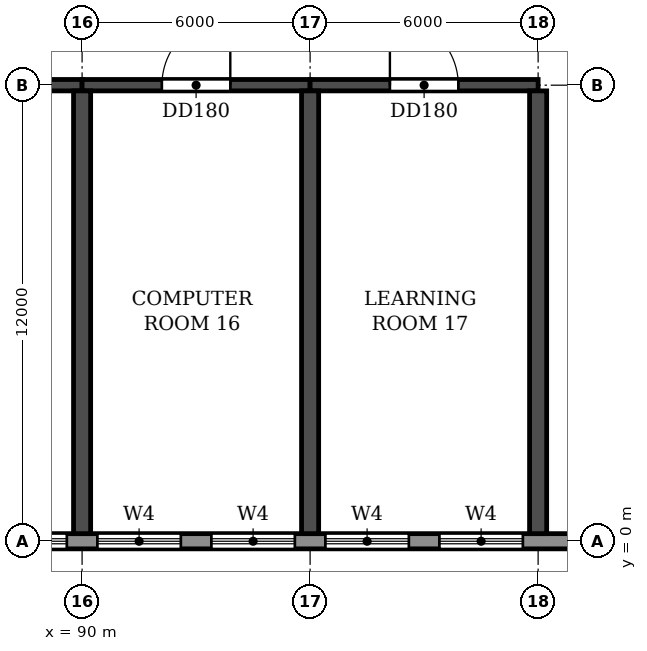
"""IFC4 building model, lengths in metres.
Left out: names, types, materials, properties, quantities, classifications, styles, units other than length and angle.
Written with IfcOpenShell. Run it as: python <this file> out.ifc"""

import sys

from ifc_helpers import new_model, si_unit, direction, frame, frame_2d, origin, place, context, subcontext, project, spatial, rectangle, extrude, element, fill, save


model = new_model("IFC4")
c1 = context("Model", 3, precision=1e-05, world=origin(), true_north=direction((0.0, 1.0)))
c2 = subcontext(c1, "Body", "Model", "MODEL_VIEW")
j1 = project(units=[si_unit("LENGTHUNIT", "METRE"), si_unit("PLANEANGLEUNIT", "RADIAN")], contexts=[c1])
p1 = place(None, origin())
s1 = spatial("IfcSite", under=j1, at=p1, CompositionType="ELEMENT")
p2 = place(p1, origin())
s2 = spatial("IfcBuilding", under=s1, at=p2, CompositionType="ELEMENT")
p3 = place(p2, frame((0.0, 0.0, 15.0)))
s3 = spatial("IfcBuildingStorey", under=s2, at=p3, CompositionType="ELEMENT", Elevation=15.0)
for number, where, z_axis, x_axis in (
    (1, (90.0, 0.2, 0.0), (0.0, 0.0, 1.0), (0.0, 1.0, 0.0)),
    (2, (96.0, 0.2, 0.0), (0.0, 0.0, 1.0), (0.0, 1.0, 0.0)),
    (3, (102.0, 0.2, 0.0), (0.0, 0.0, 1.0), (0.0, 1.0, 0.0)),
):
    element("IfcWall", number, at=place(p3, frame(where, z_axis=z_axis, x_axis=x_axis)), inside=s3, PredefinedType="SHEAR", context=c2, shape_type="SweptSolid", body=[
        extrude(rectangle(XDim=11.65, YDim=0.45, at=frame_2d((5.825, 0.0))), origin(), (0.0, 0.0, 1.0), 3.92),
    ])
p4 = place(p3, frame((84.0, 12.0, 0.0), z_axis=(0.0, 0.0, 1.0), x_axis=(1.0, 0.0, 0.0)))
e4 = element("IfcWall", 4, at=p4, inside=s3, PredefinedType="SHEAR", context=c2, shape_type="SweptSolid", body=[
    extrude(rectangle(XDim=6.0, YDim=0.3, at=frame_2d((3.0, 0.0))), origin(), (0.0, 0.0, 1.0), 3.32),
])
p5 = place(p4, frame((2.1, 0.0, 0.0)))
e5 = element("IfcOpeningElement", 5, at=p5, cuts=e4, PredefinedType="OPENING", context=c2, shape_type="SweptSolid", body=[
    extrude(rectangle(XDim=1.8, YDim=2.1, at=frame_2d((0.9, 1.05))), frame((0.0, 0.16, 0.0), z_axis=(0.0, -1.0, 0.0), x_axis=(1.0, 0.0, 0.0)), (0.0, 0.0, 1.0), 0.32),
])
p6 = place(p3, frame((90.0, 12.0, 0.0), z_axis=(0.0, 0.0, 1.0), x_axis=(1.0, 0.0, 0.0)))
e6 = element("IfcWall", 6, at=p6, inside=s3, PredefinedType="SHEAR", context=c2, shape_type="SweptSolid", body=[
    extrude(rectangle(XDim=6.0, YDim=0.3, at=frame_2d((3.0, 0.0))), origin(), (0.0, 0.0, 1.0), 3.32),
])
p7 = place(p6, frame((2.1, 0.0, 0.0)))
e7 = element("IfcOpeningElement", 7, at=p7, cuts=e6, PredefinedType="OPENING", context=c2, shape_type="SweptSolid", body=[
    extrude(rectangle(XDim=1.8, YDim=2.1, at=frame_2d((0.9, 1.05))), frame((0.0, 0.16, 0.0), z_axis=(0.0, -1.0, 0.0), x_axis=(1.0, 0.0, 0.0)), (0.0, 0.0, 1.0), 0.32),
])
p8 = place(p3, frame((96.0, 12.0, 0.0), z_axis=(0.0, 0.0, 1.0), x_axis=(1.0, 0.0, 0.0)))
e8 = element("IfcWall", 8, at=p8, inside=s3, PredefinedType="SHEAR", context=c2, shape_type="SweptSolid", body=[
    extrude(rectangle(XDim=6.0, YDim=0.3, at=frame_2d((3.0, 0.0))), origin(), (0.0, 0.0, 1.0), 3.32),
])
p9 = place(p8, frame((2.1, 0.0, 0.0)))
e9 = element("IfcOpeningElement", 9, at=p9, cuts=e8, PredefinedType="OPENING", context=c2, shape_type="SweptSolid", body=[
    extrude(rectangle(XDim=1.8, YDim=2.1, at=frame_2d((0.9, 1.05))), frame((0.0, 0.16, 0.0), z_axis=(0.0, -1.0, 0.0), x_axis=(1.0, 0.0, 0.0)), (0.0, 0.0, 1.0), 0.32),
])
p10 = place(p3, frame((-3.0, 0.0, 0.0), z_axis=(0.0, 0.0, 1.0), x_axis=(1.0, 0.0, 0.0)))
e10 = element("IfcWall", 10, at=p10, inside=s3, PredefinedType="STANDARD", context=c2, shape_type="SweptSolid", body=[
    extrude(rectangle(XDim=108.0, YDim=0.4, at=frame_2d((54.0, 0.0))), origin(), (0.0, 0.0, 1.0), 3.92),
])
p11 = place(p10, frame((3.4, 0.0, 0.9)))
e11 = element("IfcOpeningElement", 11, at=p11, cuts=e10, PredefinedType="OPENING", context=c2, shape_type="SweptSolid", body=[
    extrude(rectangle(XDim=2.2, YDim=2.7, at=frame_2d((1.1, 1.35))), frame((0.0, 0.21, 0.0), z_axis=(0.0, -1.0, 0.0), x_axis=(1.0, 0.0, 0.0)), (0.0, 0.0, 1.0), 0.42),
])
p12 = place(p10, frame((6.4, 0.0, 0.9)))
e12 = element("IfcOpeningElement", 12, at=p12, cuts=e10, PredefinedType="OPENING", context=c2, shape_type="SweptSolid", body=[
    extrude(rectangle(XDim=2.2, YDim=2.7, at=frame_2d((1.1, 1.35))), frame((0.0, 0.21, 0.0), z_axis=(0.0, -1.0, 0.0), x_axis=(1.0, 0.0, 0.0)), (0.0, 0.0, 1.0), 0.42),
])
p13 = place(p10, frame((9.4, 0.0, 0.9)))
e13 = element("IfcOpeningElement", 13, at=p13, cuts=e10, PredefinedType="OPENING", context=c2, shape_type="SweptSolid", body=[
    extrude(rectangle(XDim=2.2, YDim=2.7, at=frame_2d((1.1, 1.35))), frame((0.0, 0.21, 0.0), z_axis=(0.0, -1.0, 0.0), x_axis=(1.0, 0.0, 0.0)), (0.0, 0.0, 1.0), 0.42),
])
p14 = place(p10, frame((12.4, 0.0, 0.9)))
e14 = element("IfcOpeningElement", 14, at=p14, cuts=e10, PredefinedType="OPENING", context=c2, shape_type="SweptSolid", body=[
    extrude(rectangle(XDim=2.2, YDim=2.7, at=frame_2d((1.1, 1.35))), frame((0.0, 0.21, 0.0), z_axis=(0.0, -1.0, 0.0), x_axis=(1.0, 0.0, 0.0)), (0.0, 0.0, 1.0), 0.42),
])
p15 = place(p10, frame((15.4, 0.0, 0.9)))
e15 = element("IfcOpeningElement", 15, at=p15, cuts=e10, PredefinedType="OPENING", context=c2, shape_type="SweptSolid", body=[
    extrude(rectangle(XDim=2.2, YDim=2.7, at=frame_2d((1.1, 1.35))), frame((0.0, 0.21, 0.0), z_axis=(0.0, -1.0, 0.0), x_axis=(1.0, 0.0, 0.0)), (0.0, 0.0, 1.0), 0.42),
])
p16 = place(p10, frame((18.4, 0.0, 0.9)))
e16 = element("IfcOpeningElement", 16, at=p16, cuts=e10, PredefinedType="OPENING", context=c2, shape_type="SweptSolid", body=[
    extrude(rectangle(XDim=2.2, YDim=2.7, at=frame_2d((1.1, 1.35))), frame((0.0, 0.21, 0.0), z_axis=(0.0, -1.0, 0.0), x_axis=(1.0, 0.0, 0.0)), (0.0, 0.0, 1.0), 0.42),
])
p17 = place(p10, frame((21.4, 0.0, 0.9)))
e17 = element("IfcOpeningElement", 17, at=p17, cuts=e10, PredefinedType="OPENING", context=c2, shape_type="SweptSolid", body=[
    extrude(rectangle(XDim=2.2, YDim=2.7, at=frame_2d((1.1, 1.35))), frame((0.0, 0.21, 0.0), z_axis=(0.0, -1.0, 0.0), x_axis=(1.0, 0.0, 0.0)), (0.0, 0.0, 1.0), 0.42),
])
p18 = place(p10, frame((24.4, 0.0, 0.9)))
e18 = element("IfcOpeningElement", 18, at=p18, cuts=e10, PredefinedType="OPENING", context=c2, shape_type="SweptSolid", body=[
    extrude(rectangle(XDim=2.2, YDim=2.7, at=frame_2d((1.1, 1.35))), frame((0.0, 0.21, 0.0), z_axis=(0.0, -1.0, 0.0), x_axis=(1.0, 0.0, 0.0)), (0.0, 0.0, 1.0), 0.42),
])
p19 = place(p10, frame((27.4, 0.0, 0.9)))
e19 = element("IfcOpeningElement", 19, at=p19, cuts=e10, PredefinedType="OPENING", context=c2, shape_type="SweptSolid", body=[
    extrude(rectangle(XDim=2.2, YDim=2.7, at=frame_2d((1.1, 1.35))), frame((0.0, 0.21, 0.0), z_axis=(0.0, -1.0, 0.0), x_axis=(1.0, 0.0, 0.0)), (0.0, 0.0, 1.0), 0.42),
])
p20 = place(p10, frame((30.4, 0.0, 0.9)))
e20 = element("IfcOpeningElement", 20, at=p20, cuts=e10, PredefinedType="OPENING", context=c2, shape_type="SweptSolid", body=[
    extrude(rectangle(XDim=2.2, YDim=2.7, at=frame_2d((1.1, 1.35))), frame((0.0, 0.21, 0.0), z_axis=(0.0, -1.0, 0.0), x_axis=(1.0, 0.0, 0.0)), (0.0, 0.0, 1.0), 0.42),
])
p21 = place(p10, frame((33.4, 0.0, 0.9)))
e21 = element("IfcOpeningElement", 21, at=p21, cuts=e10, PredefinedType="OPENING", context=c2, shape_type="SweptSolid", body=[
    extrude(rectangle(XDim=2.2, YDim=2.7, at=frame_2d((1.1, 1.35))), frame((0.0, 0.21, 0.0), z_axis=(0.0, -1.0, 0.0), x_axis=(1.0, 0.0, 0.0)), (0.0, 0.0, 1.0), 0.42),
])
p22 = place(p10, frame((36.4, 0.0, 0.9)))
e22 = element("IfcOpeningElement", 22, at=p22, cuts=e10, PredefinedType="OPENING", context=c2, shape_type="SweptSolid", body=[
    extrude(rectangle(XDim=2.2, YDim=2.7, at=frame_2d((1.1, 1.35))), frame((0.0, 0.21, 0.0), z_axis=(0.0, -1.0, 0.0), x_axis=(1.0, 0.0, 0.0)), (0.0, 0.0, 1.0), 0.42),
])
p23 = place(p10, frame((39.4, 0.0, 0.9)))
e23 = element("IfcOpeningElement", 23, at=p23, cuts=e10, PredefinedType="OPENING", context=c2, shape_type="SweptSolid", body=[
    extrude(rectangle(XDim=2.2, YDim=2.7, at=frame_2d((1.1, 1.35))), frame((0.0, 0.21, 0.0), z_axis=(0.0, -1.0, 0.0), x_axis=(1.0, 0.0, 0.0)), (0.0, 0.0, 1.0), 0.42),
])
p24 = place(p10, frame((42.4, 0.0, 0.9)))
e24 = element("IfcOpeningElement", 24, at=p24, cuts=e10, PredefinedType="OPENING", context=c2, shape_type="SweptSolid", body=[
    extrude(rectangle(XDim=2.2, YDim=2.7, at=frame_2d((1.1, 1.35))), frame((0.0, 0.21, 0.0), z_axis=(0.0, -1.0, 0.0), x_axis=(1.0, 0.0, 0.0)), (0.0, 0.0, 1.0), 0.42),
])
p25 = place(p10, frame((45.4, 0.0, 0.9)))
e25 = element("IfcOpeningElement", 25, at=p25, cuts=e10, PredefinedType="OPENING", context=c2, shape_type="SweptSolid", body=[
    extrude(rectangle(XDim=2.2, YDim=2.7, at=frame_2d((1.1, 1.35))), frame((0.0, 0.21, 0.0), z_axis=(0.0, -1.0, 0.0), x_axis=(1.0, 0.0, 0.0)), (0.0, 0.0, 1.0), 0.42),
])
p26 = place(p10, frame((48.4, 0.0, 0.9)))
e26 = element("IfcOpeningElement", 26, at=p26, cuts=e10, PredefinedType="OPENING", context=c2, shape_type="SweptSolid", body=[
    extrude(rectangle(XDim=2.2, YDim=2.7, at=frame_2d((1.1, 1.35))), frame((0.0, 0.21, 0.0), z_axis=(0.0, -1.0, 0.0), x_axis=(1.0, 0.0, 0.0)), (0.0, 0.0, 1.0), 0.42),
])
p27 = place(p10, frame((51.4, 0.0, 0.9)))
e27 = element("IfcOpeningElement", 27, at=p27, cuts=e10, PredefinedType="OPENING", context=c2, shape_type="SweptSolid", body=[
    extrude(rectangle(XDim=2.2, YDim=2.7, at=frame_2d((1.1, 1.35))), frame((0.0, 0.21, 0.0), z_axis=(0.0, -1.0, 0.0), x_axis=(1.0, 0.0, 0.0)), (0.0, 0.0, 1.0), 0.42),
])
p28 = place(p10, frame((54.4, 0.0, 0.9)))
e28 = element("IfcOpeningElement", 28, at=p28, cuts=e10, PredefinedType="OPENING", context=c2, shape_type="SweptSolid", body=[
    extrude(rectangle(XDim=2.2, YDim=2.7, at=frame_2d((1.1, 1.35))), frame((0.0, 0.21, 0.0), z_axis=(0.0, -1.0, 0.0), x_axis=(1.0, 0.0, 0.0)), (0.0, 0.0, 1.0), 0.42),
])
p29 = place(p10, frame((57.4, 0.0, 0.9)))
e29 = element("IfcOpeningElement", 29, at=p29, cuts=e10, PredefinedType="OPENING", context=c2, shape_type="SweptSolid", body=[
    extrude(rectangle(XDim=2.2, YDim=2.7, at=frame_2d((1.1, 1.35))), frame((0.0, 0.21, 0.0), z_axis=(0.0, -1.0, 0.0), x_axis=(1.0, 0.0, 0.0)), (0.0, 0.0, 1.0), 0.42),
])
p30 = place(p10, frame((60.4, 0.0, 0.9)))
e30 = element("IfcOpeningElement", 30, at=p30, cuts=e10, PredefinedType="OPENING", context=c2, shape_type="SweptSolid", body=[
    extrude(rectangle(XDim=2.2, YDim=2.7, at=frame_2d((1.1, 1.35))), frame((0.0, 0.21, 0.0), z_axis=(0.0, -1.0, 0.0), x_axis=(1.0, 0.0, 0.0)), (0.0, 0.0, 1.0), 0.42),
])
p31 = place(p10, frame((63.4, 0.0, 0.9)))
e31 = element("IfcOpeningElement", 31, at=p31, cuts=e10, PredefinedType="OPENING", context=c2, shape_type="SweptSolid", body=[
    extrude(rectangle(XDim=2.2, YDim=2.7, at=frame_2d((1.1, 1.35))), frame((0.0, 0.21, 0.0), z_axis=(0.0, -1.0, 0.0), x_axis=(1.0, 0.0, 0.0)), (0.0, 0.0, 1.0), 0.42),
])
p32 = place(p10, frame((66.4, 0.0, 0.9)))
e32 = element("IfcOpeningElement", 32, at=p32, cuts=e10, PredefinedType="OPENING", context=c2, shape_type="SweptSolid", body=[
    extrude(rectangle(XDim=2.2, YDim=2.7, at=frame_2d((1.1, 1.35))), frame((0.0, 0.21, 0.0), z_axis=(0.0, -1.0, 0.0), x_axis=(1.0, 0.0, 0.0)), (0.0, 0.0, 1.0), 0.42),
])
p33 = place(p10, frame((69.4, 0.0, 0.9)))
e33 = element("IfcOpeningElement", 33, at=p33, cuts=e10, PredefinedType="OPENING", context=c2, shape_type="SweptSolid", body=[
    extrude(rectangle(XDim=2.2, YDim=2.7, at=frame_2d((1.1, 1.35))), frame((0.0, 0.21, 0.0), z_axis=(0.0, -1.0, 0.0), x_axis=(1.0, 0.0, 0.0)), (0.0, 0.0, 1.0), 0.42),
])
p34 = place(p10, frame((72.4, 0.0, 0.9)))
e34 = element("IfcOpeningElement", 34, at=p34, cuts=e10, PredefinedType="OPENING", context=c2, shape_type="SweptSolid", body=[
    extrude(rectangle(XDim=2.2, YDim=2.7, at=frame_2d((1.1, 1.35))), frame((0.0, 0.21, 0.0), z_axis=(0.0, -1.0, 0.0), x_axis=(1.0, 0.0, 0.0)), (0.0, 0.0, 1.0), 0.42),
])
p35 = place(p10, frame((75.4, 0.0, 0.9)))
e35 = element("IfcOpeningElement", 35, at=p35, cuts=e10, PredefinedType="OPENING", context=c2, shape_type="SweptSolid", body=[
    extrude(rectangle(XDim=2.2, YDim=2.7, at=frame_2d((1.1, 1.35))), frame((0.0, 0.21, 0.0), z_axis=(0.0, -1.0, 0.0), x_axis=(1.0, 0.0, 0.0)), (0.0, 0.0, 1.0), 0.42),
])
p36 = place(p10, frame((78.4, 0.0, 0.9)))
e36 = element("IfcOpeningElement", 36, at=p36, cuts=e10, PredefinedType="OPENING", context=c2, shape_type="SweptSolid", body=[
    extrude(rectangle(XDim=2.2, YDim=2.7, at=frame_2d((1.1, 1.35))), frame((0.0, 0.21, 0.0), z_axis=(0.0, -1.0, 0.0), x_axis=(1.0, 0.0, 0.0)), (0.0, 0.0, 1.0), 0.42),
])
p37 = place(p10, frame((81.4, 0.0, 0.9)))
e37 = element("IfcOpeningElement", 37, at=p37, cuts=e10, PredefinedType="OPENING", context=c2, shape_type="SweptSolid", body=[
    extrude(rectangle(XDim=2.2, YDim=2.7, at=frame_2d((1.1, 1.35))), frame((0.0, 0.21, 0.0), z_axis=(0.0, -1.0, 0.0), x_axis=(1.0, 0.0, 0.0)), (0.0, 0.0, 1.0), 0.42),
])
p38 = place(p10, frame((84.4, 0.0, 0.9)))
e38 = element("IfcOpeningElement", 38, at=p38, cuts=e10, PredefinedType="OPENING", context=c2, shape_type="SweptSolid", body=[
    extrude(rectangle(XDim=2.2, YDim=2.7, at=frame_2d((1.1, 1.35))), frame((0.0, 0.21, 0.0), z_axis=(0.0, -1.0, 0.0), x_axis=(1.0, 0.0, 0.0)), (0.0, 0.0, 1.0), 0.42),
])
p39 = place(p10, frame((87.4, 0.0, 0.9)))
e39 = element("IfcOpeningElement", 39, at=p39, cuts=e10, PredefinedType="OPENING", context=c2, shape_type="SweptSolid", body=[
    extrude(rectangle(XDim=2.2, YDim=2.7, at=frame_2d((1.1, 1.35))), frame((0.0, 0.21, 0.0), z_axis=(0.0, -1.0, 0.0), x_axis=(1.0, 0.0, 0.0)), (0.0, 0.0, 1.0), 0.42),
])
p40 = place(p10, frame((90.4, 0.0, 0.9)))
e40 = element("IfcOpeningElement", 40, at=p40, cuts=e10, PredefinedType="OPENING", context=c2, shape_type="SweptSolid", body=[
    extrude(rectangle(XDim=2.2, YDim=2.7, at=frame_2d((1.1, 1.35))), frame((0.0, 0.21, 0.0), z_axis=(0.0, -1.0, 0.0), x_axis=(1.0, 0.0, 0.0)), (0.0, 0.0, 1.0), 0.42),
])
p41 = place(p10, frame((93.4, 0.0, 0.9)))
e41 = element("IfcOpeningElement", 41, at=p41, cuts=e10, PredefinedType="OPENING", context=c2, shape_type="SweptSolid", body=[
    extrude(rectangle(XDim=2.2, YDim=2.7, at=frame_2d((1.1, 1.35))), frame((0.0, 0.21, 0.0), z_axis=(0.0, -1.0, 0.0), x_axis=(1.0, 0.0, 0.0)), (0.0, 0.0, 1.0), 0.42),
])
p42 = place(p10, frame((96.4, 0.0, 0.9)))
e42 = element("IfcOpeningElement", 42, at=p42, cuts=e10, PredefinedType="OPENING", context=c2, shape_type="SweptSolid", body=[
    extrude(rectangle(XDim=2.2, YDim=2.7, at=frame_2d((1.1, 1.35))), frame((0.0, 0.21, 0.0), z_axis=(0.0, -1.0, 0.0), x_axis=(1.0, 0.0, 0.0)), (0.0, 0.0, 1.0), 0.42),
])
p43 = place(p10, frame((99.4, 0.0, 0.9)))
e43 = element("IfcOpeningElement", 43, at=p43, cuts=e10, PredefinedType="OPENING", context=c2, shape_type="SweptSolid", body=[
    extrude(rectangle(XDim=2.2, YDim=2.7, at=frame_2d((1.1, 1.35))), frame((0.0, 0.21, 0.0), z_axis=(0.0, -1.0, 0.0), x_axis=(1.0, 0.0, 0.0)), (0.0, 0.0, 1.0), 0.42),
])
p44 = place(p10, frame((102.4, 0.0, 0.9)))
e44 = element("IfcOpeningElement", 44, at=p44, cuts=e10, PredefinedType="OPENING", context=c2, shape_type="SweptSolid", body=[
    extrude(rectangle(XDim=2.2, YDim=2.7, at=frame_2d((1.1, 1.35))), frame((0.0, 0.21, 0.0), z_axis=(0.0, -1.0, 0.0), x_axis=(1.0, 0.0, 0.0)), (0.0, 0.0, 1.0), 0.42),
])
p45 = place(p40, origin())
e45 = element("IfcWindow", 45, at=p45, inside=s3, PartitioningType="DOUBLE_PANEL_HORIZONTAL", PredefinedType="WINDOW", context=c2, shape_type="SweptSolid", body=[
    extrude(rectangle(XDim=2.2, YDim=2.7, at=frame_2d((1.1, 1.35))), frame((0.0, 0.03, 0.0), z_axis=(0.0, -1.0, 0.0), x_axis=(1.0, 0.0, 0.0)), (0.0, 0.0, 1.0), 0.06),
])
fill(e40, e45)
p46 = place(p41, origin())
e46 = element("IfcWindow", 46, at=p46, inside=s3, PartitioningType="DOUBLE_PANEL_HORIZONTAL", PredefinedType="WINDOW", context=c2, shape_type="SweptSolid", body=[
    extrude(rectangle(XDim=2.2, YDim=2.7, at=frame_2d((1.1, 1.35))), frame((0.0, 0.03, 0.0), z_axis=(0.0, -1.0, 0.0), x_axis=(1.0, 0.0, 0.0)), (0.0, 0.0, 1.0), 0.06),
])
fill(e41, e46)
p47 = place(p42, origin())
e47 = element("IfcWindow", 47, at=p47, inside=s3, PartitioningType="DOUBLE_PANEL_HORIZONTAL", PredefinedType="WINDOW", context=c2, shape_type="SweptSolid", body=[
    extrude(rectangle(XDim=2.2, YDim=2.7, at=frame_2d((1.1, 1.35))), frame((0.0, 0.03, 0.0), z_axis=(0.0, -1.0, 0.0), x_axis=(1.0, 0.0, 0.0)), (0.0, 0.0, 1.0), 0.06),
])
fill(e42, e47)
p48 = place(p43, origin())
e48 = element("IfcWindow", 48, at=p48, inside=s3, PartitioningType="DOUBLE_PANEL_HORIZONTAL", PredefinedType="WINDOW", context=c2, shape_type="SweptSolid", body=[
    extrude(rectangle(XDim=2.2, YDim=2.7, at=frame_2d((1.1, 1.35))), frame((0.0, 0.03, 0.0), z_axis=(0.0, -1.0, 0.0), x_axis=(1.0, 0.0, 0.0)), (0.0, 0.0, 1.0), 0.06),
])
fill(e43, e48)
p49 = place(p44, origin())
e49 = element("IfcWindow", 49, at=p49, inside=s3, PartitioningType="DOUBLE_PANEL_HORIZONTAL", PredefinedType="WINDOW", context=c2, shape_type="SweptSolid", body=[
    extrude(rectangle(XDim=2.2, YDim=2.7, at=frame_2d((1.1, 1.35))), frame((0.0, 0.03, 0.0), z_axis=(0.0, -1.0, 0.0), x_axis=(1.0, 0.0, 0.0)), (0.0, 0.0, 1.0), 0.06),
])
fill(e44, e49)
p50 = place(p7, origin())
e50 = element("IfcDoor", 50, at=p50, inside=s3, OperationType="DOUBLE_DOOR_SINGLE_SWING", PredefinedType="DOOR", context=c2, shape_type="SweptSolid", body=[
    extrude(rectangle(XDim=1.8, YDim=2.1, at=frame_2d((0.9, 1.05))), frame((0.0, 0.025, 0.0), z_axis=(0.0, -1.0, 0.0), x_axis=(1.0, 0.0, 0.0)), (0.0, 0.0, 1.0), 0.05),
])
fill(e7, e50)
p51 = place(p9, origin())
e51 = element("IfcDoor", 51, at=p51, inside=s3, OperationType="DOUBLE_DOOR_SINGLE_SWING", PredefinedType="DOOR", context=c2, shape_type="SweptSolid", body=[
    extrude(rectangle(XDim=1.8, YDim=2.1, at=frame_2d((0.9, 1.05))), frame((0.0, 0.025, 0.0), z_axis=(0.0, -1.0, 0.0), x_axis=(1.0, 0.0, 0.0)), (0.0, 0.0, 1.0), 0.05),
])
fill(e9, e51)
save(model, sys.argv[1])
